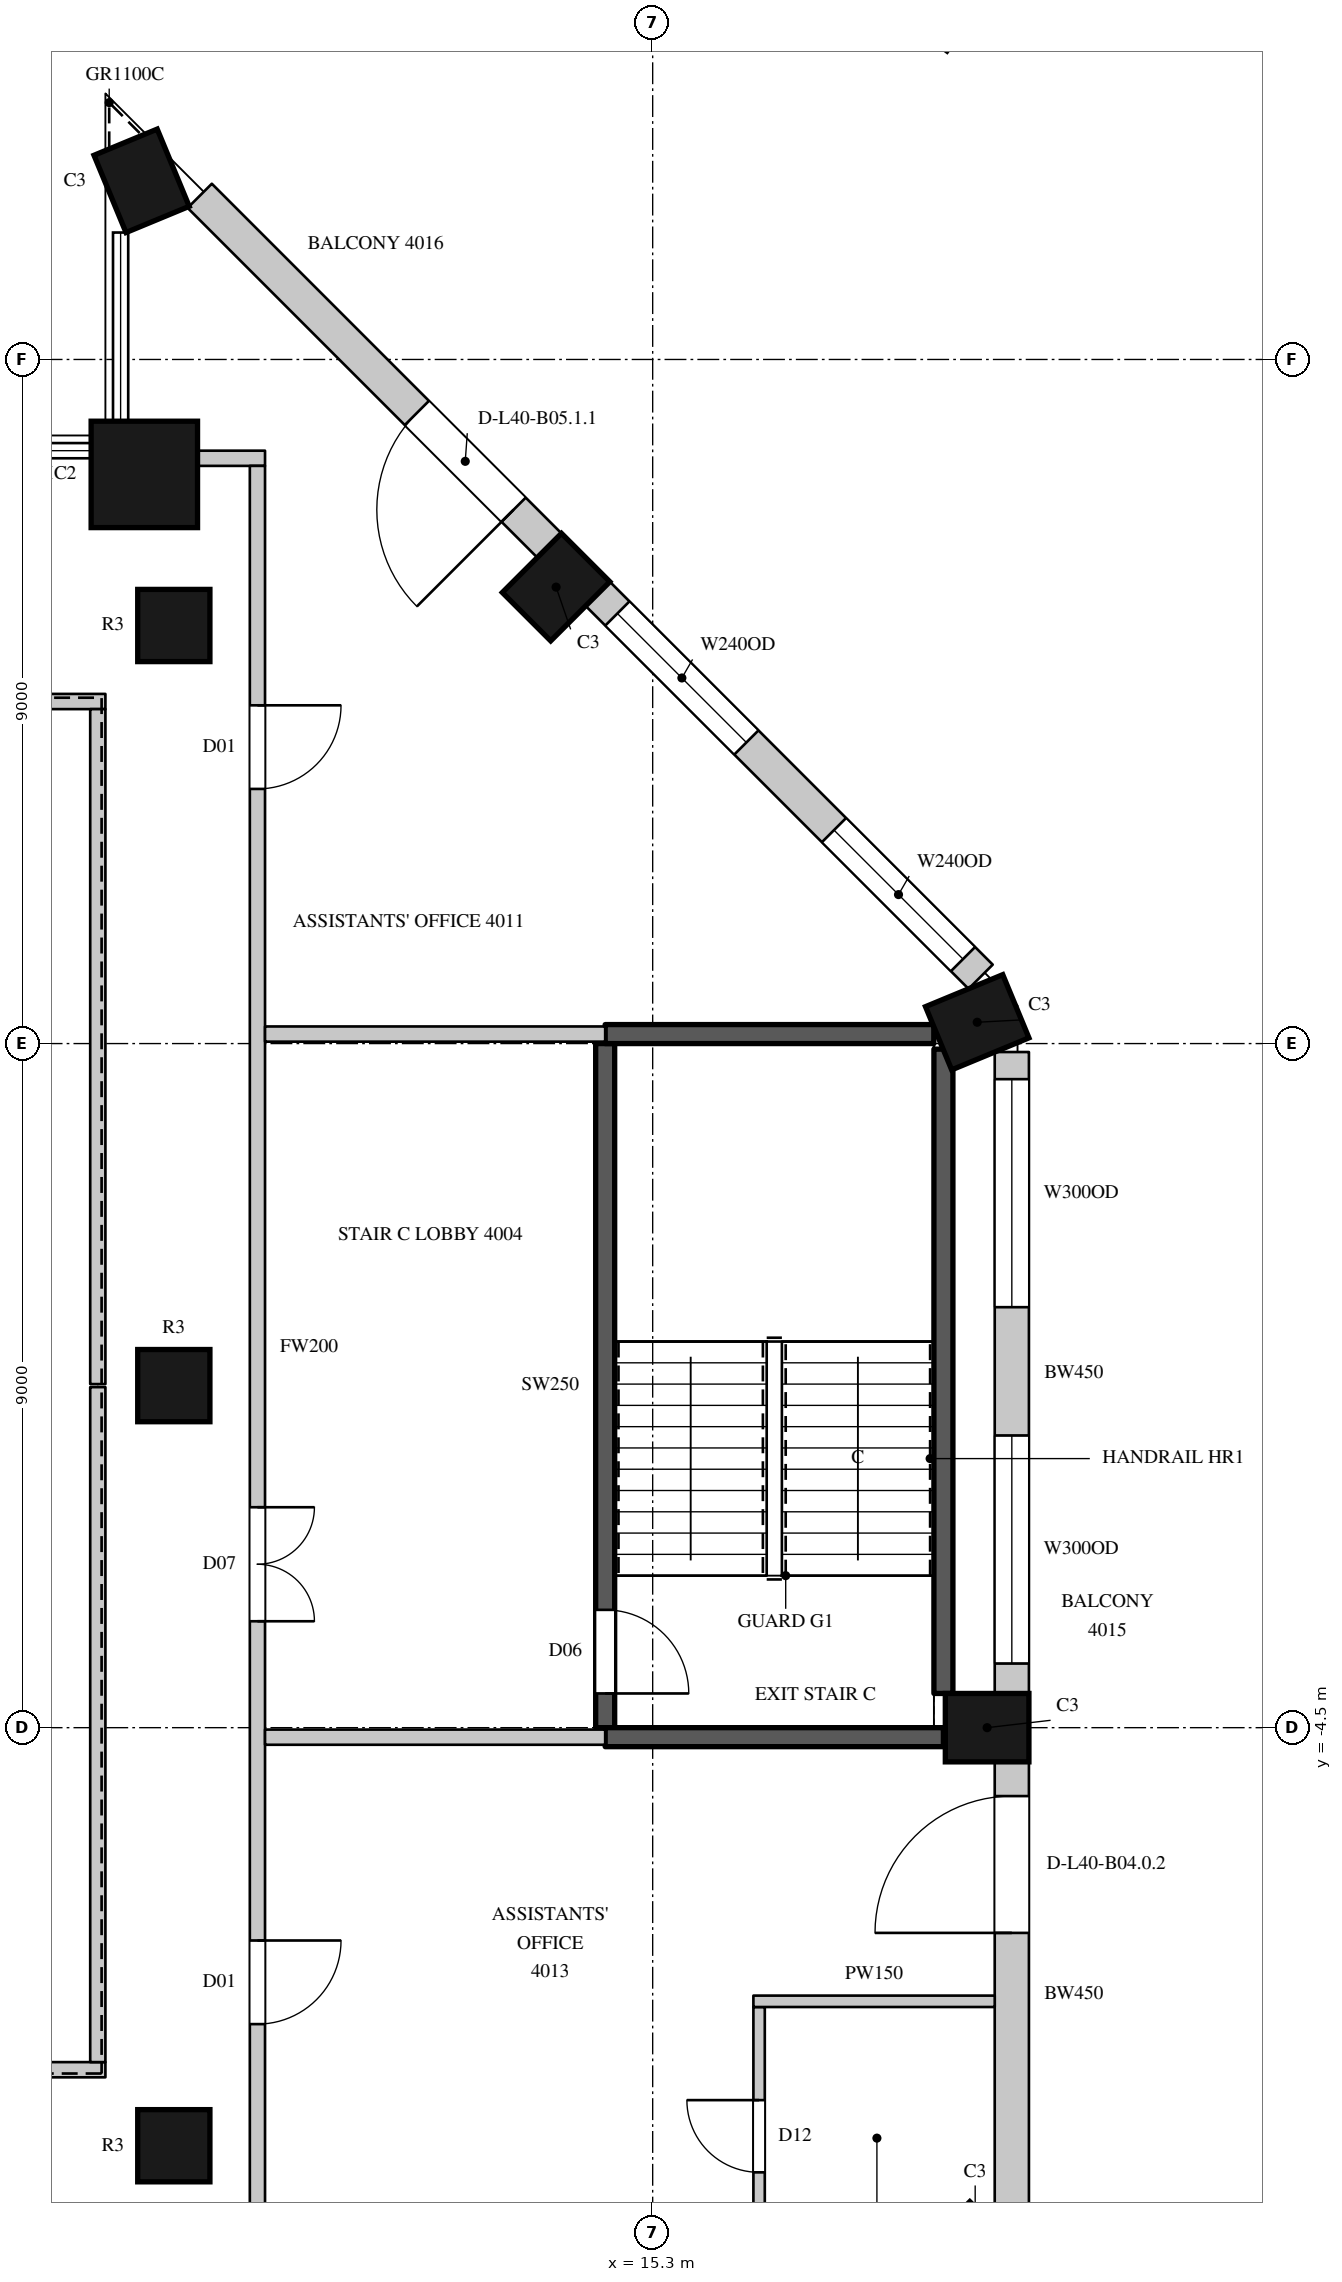
"""IFC4 building model, lengths in metres.
Left out: names, types, materials, properties, quantities, classifications, styles, units other than length and angle.
Written with IfcOpenShell. Run it as: python <this file> out.ifc"""

import sys

from ifc_helpers import new_model, si_unit, direction, frame, frame_2d, origin, origin_2d, place, context, subcontext, project, spatial, rectangle, circle, extrude, element, fill, save


model = new_model("IFC4")
c1 = context("Model", 3, precision=1e-05, world=origin(), true_north=direction((0.0, 1.0)))
c2 = subcontext(c1, "Body", "Model", "MODEL_VIEW")
j1 = project(units=[si_unit("LENGTHUNIT", "METRE"), si_unit("PLANEANGLEUNIT", "RADIAN")], contexts=[c1])
p1 = place(None, origin())
s1 = spatial("IfcSite", under=j1, at=p1, CompositionType="ELEMENT")
p2 = place(p1, origin())
s2 = spatial("IfcBuilding", under=s1, at=p2, CompositionType="ELEMENT")
p3 = place(p2, frame((0.0, 0.0, 185.1)))
s3 = spatial("IfcBuildingStorey", under=s2, at=p3, CompositionType="ELEMENT", Elevation=185.1)
for number, where, z_axis, x_axis in (
    (1, (19.543, -11.443, 0.0), (0.0, 0.0, 1.0), (0.707, 0.707, 0.0)),
    (2, (19.7, -4.5, 0.0), (0.0, 0.0, 1.0), (0.0, 1.0, 0.0)),
    (3, (19.57, 4.78, 0.0), (0.0, 0.0, 1.0), (-0.383, 0.924, 0.0)),
    (4, (14.029, 10.505, 0.0), (0.0, 0.0, 1.0), (-0.707, 0.707, 0.0)),
    (5, (8.576, 15.85, 0.0), (0.0, 0.0, 1.0), (-0.924, -0.383, 0.0)),
):
    element("IfcColumn", number, at=place(p3, frame(where, z_axis=z_axis, x_axis=x_axis)), inside=s3, PredefinedType="COLUMN", context=c2, shape_type="SweptSolid", body=[
        extrude(rectangle(XDim=0.9, YDim=1.1, at=origin_2d()), origin(), (0.0, 0.0, 1.0), 4.1),
    ])
p4 = place(p3, frame((8.612, 11.988, 0.0), z_axis=(0.0, 0.0, 1.0), x_axis=(1.0, 0.0, 0.0)))
e6 = element("IfcColumn", 6, at=p4, inside=s3, PredefinedType="COLUMN", context=c2, shape_type="SweptSolid", body=[
    extrude(circle(Radius=0.7, at=origin_2d()), origin(), (0.0, 0.0, 1.0), 4.1),
])
for number, where, z_axis, x_axis in (
    (7, (9.0, -10.0, 0.0), (0.0, 0.0, 1.0), (1.0, 0.0, 0.0)),
    (8, (9.0, 0.0, 0.0), (0.0, 0.0, 1.0), (1.0, 0.0, 0.0)),
    (9, (9.0, 10.0, 0.0), (0.0, 0.0, 1.0), (1.0, 0.0, 0.0)),
):
    element("IfcColumn", number, at=place(p3, frame(where, z_axis=z_axis, x_axis=x_axis)), inside=s3, PredefinedType="COLUMN", context=c2, shape_type="SweptSolid", body=[
        extrude(circle(Radius=0.475, at=origin_2d()), origin(), (0.0, 0.0, 1.0), 4.1),
    ])
p5 = place(p3, frame((20.025, -11.064, 0.0), z_axis=(0.0, 0.0, 1.0), x_axis=(0.0, 1.0, 0.0)))
e10 = element("IfcWall", 10, at=p5, inside=s3, PredefinedType="SOLIDWALL", context=c2, shape_type="SweptSolid", body=[
    extrude(rectangle(XDim=6.114, YDim=0.45, at=frame_2d((3.057, 0.0))), origin(), (0.0, 0.0, 1.0), 3.8),
])
p6 = place(p5, frame((3.864, 0.0, 0.0)))
e11 = element("IfcOpeningElement", 11, at=p6, cuts=e10, PredefinedType="OPENING", context=c2, shape_type="SweptSolid", body=[
    extrude(rectangle(XDim=1.8, YDim=2.4, at=frame_2d((0.9, 1.2))), frame((0.0, 0.235, 0.0), z_axis=(0.0, -1.0, 0.0), x_axis=(1.0, 0.0, 0.0)), (0.0, 0.0, 1.0), 0.47),
])
p7 = place(p3, frame((20.025, -4.05, 0.0), z_axis=(0.0, 0.0, 1.0), x_axis=(0.0, 1.0, 0.0)))
e12 = element("IfcWall", 12, at=p7, inside=s3, PredefinedType="SOLIDWALL", context=c2, shape_type="SweptSolid", body=[
    extrude(rectangle(XDim=8.439, YDim=0.45, at=frame_2d((4.219, 0.0))), origin(), (0.0, 0.0, 1.0), 3.8),
])
p8 = place(p7, frame((0.394, 0.0, 1.05)))
e13 = element("IfcOpeningElement", 13, at=p8, cuts=e12, PredefinedType="OPENING", context=c2, shape_type="SweptSolid", body=[
    extrude(rectangle(XDim=3.0, YDim=2.4, at=frame_2d((1.5, 1.2))), frame((0.0, 0.235, 0.0), z_axis=(0.0, -1.0, 0.0), x_axis=(1.0, 0.0, 0.0)), (0.0, 0.0, 1.0), 0.47),
])
p9 = place(p7, frame((5.082, 0.0, 1.05)))
e14 = element("IfcOpeningElement", 14, at=p9, cuts=e12, PredefinedType="OPENING", context=c2, shape_type="SweptSolid", body=[
    extrude(rectangle(XDim=3.0, YDim=2.4, at=frame_2d((1.5, 1.2))), frame((0.0, 0.235, 0.0), z_axis=(0.0, -1.0, 0.0), x_axis=(1.0, 0.0, 0.0)), (0.0, 0.0, 1.0), 0.47),
])
p10 = place(p3, frame((19.615, 5.379, 0.0), z_axis=(0.0, 0.0, 1.0), x_axis=(-0.707089646058, 0.7071239159, 0.0)))
e15 = element("IfcWall", 15, at=p10, inside=s3, PredefinedType="SOLIDWALL", context=c2, shape_type="SweptSolid", body=[
    extrude(rectangle(XDim=7.124, YDim=0.45, at=frame_2d((3.562, 0.0))), origin(), (0.0, 0.0, 1.0), 3.8),
])
p11 = place(p10, frame((0.328, 0.0, 1.05)))
e16 = element("IfcOpeningElement", 16, at=p11, cuts=e15, PredefinedType="OPENING", context=c2, shape_type="SweptSolid", body=[
    extrude(rectangle(XDim=2.4, YDim=2.4, at=frame_2d((1.2, 1.2))), frame((0.0, 0.235, 0.0), z_axis=(0.0, -1.0, 0.0), x_axis=(1.0, 0.0, 0.0)), (0.0, 0.0, 1.0), 0.47),
])
p12 = place(p10, frame((4.359, 0.0, 1.05)))
e17 = element("IfcOpeningElement", 17, at=p12, cuts=e15, PredefinedType="OPENING", context=c2, shape_type="SweptSolid", body=[
    extrude(rectangle(XDim=2.4, YDim=2.4, at=frame_2d((1.2, 1.2))), frame((0.0, 0.235, 0.0), z_axis=(0.0, -1.0, 0.0), x_axis=(1.0, 0.0, 0.0)), (0.0, 0.0, 1.0), 0.47),
])
p13 = place(p3, frame((13.941, 11.053, 0.0), z_axis=(0.0, 0.0, 1.0), x_axis=(-0.707106781187, 0.707106781187, 0.0)))
e18 = element("IfcWall", 18, at=p13, inside=s3, PredefinedType="SOLIDWALL", context=c2, shape_type="SweptSolid", body=[
    extrude(rectangle(XDim=6.505, YDim=0.45, at=frame_2d((3.252, 0.0))), origin(), (0.0, 0.0, 1.0), 3.8),
])
p14 = place(p13, frame((0.665, 0.0, 0.0)))
e19 = element("IfcOpeningElement", 19, at=p14, cuts=e18, PredefinedType="OPENING", context=c2, shape_type="SweptSolid", body=[
    extrude(rectangle(XDim=1.8, YDim=2.4, at=frame_2d((0.9, 1.2))), frame((0.0, 0.235, 0.0), z_axis=(0.0, -1.0, 0.0), x_axis=(1.0, 0.0, 0.0)), (0.0, 0.0, 1.0), 0.47),
])
for number, where, z_axis, x_axis in (
    (20, (-6.1, -9.0, 0.0), (0.0, 0.0, 1.0), (1.0, 0.0, 0.0)),
    (21, (-6.1, 9.0, 0.0), (0.0, 0.0, 1.0), (1.0, 0.0, 0.0)),
):
    element("IfcWall", number, at=place(p3, frame(where, z_axis=z_axis, x_axis=x_axis)), inside=s3, PredefinedType="PARTITIONING", context=c2, shape_type="SweptSolid", body=[
        extrude(rectangle(XDim=14.2, YDim=0.2, at=frame_2d((7.1, 0.0))), origin(), (0.0, 0.0, 1.0), 3.8),
    ])
for number, where, z_axis, x_axis in (
    (22, (8.0, -8.9, 0.0), (0.0, 0.0, 1.0), (0.0, 1.0, 0.0)),
    (23, (8.0, 0.02, 0.0), (0.0, 0.0, 1.0), (0.0, 1.0, 0.0)),
):
    element("IfcWall", number, at=place(p3, frame(where, z_axis=z_axis, x_axis=x_axis)), inside=s3, PredefinedType="PARTITIONING", context=c2, shape_type="SweptSolid", body=[
        extrude(rectangle(XDim=8.88, YDim=0.2, at=frame_2d((4.44, 0.0))), origin(), (0.0, 0.0, 1.0), 3.8),
    ])
p15 = place(p3, frame((9.296, 12.2, 0.0), z_axis=(0.0, 0.0, 1.0), x_axis=(1.0, 0.0, 0.0)))
e24 = element("IfcWall", 24, at=p15, inside=s3, PredefinedType="PARTITIONING", context=c2, shape_type="SweptSolid", body=[
    extrude(rectangle(XDim=0.904, YDim=0.2, at=frame_2d((0.452, 0.0))), origin(), (0.0, 0.0, 1.0), 3.8),
])
p16 = place(p3, frame((10.1, -11.1, 0.0), z_axis=(0.0, 0.0, 1.0), x_axis=(0.0, 1.0, 0.0)))
e25 = element("IfcWall", 25, at=p16, inside=s3, PredefinedType="PARTITIONING", context=c2, shape_type="SweptSolid", body=[
    extrude(rectangle(XDim=23.2, YDim=0.2, at=frame_2d((11.6, 0.0))), origin(), (0.0, 0.0, 1.0), 3.8),
])
p17 = place(p16, frame((8.0, 0.0, 0.0)))
e26 = element("IfcOpeningElement", 26, at=p17, cuts=e25, PredefinedType="OPENING", context=c2, shape_type="SweptSolid", body=[
    extrude(rectangle(XDim=1.5, YDim=2.4, at=frame_2d((0.75, 1.2))), frame((0.0, 0.11, 0.0), z_axis=(0.0, -1.0, 0.0), x_axis=(1.0, 0.0, 0.0)), (0.0, 0.0, 1.0), 0.22),
])
p18 = place(p16, frame((18.95, 0.0, 0.0)))
e27 = element("IfcOpeningElement", 27, at=p18, cuts=e25, PredefinedType="OPENING", context=c2, shape_type="SweptSolid", body=[
    extrude(rectangle(XDim=1.1, YDim=2.4, at=frame_2d((0.55, 1.2))), frame((0.0, 0.11, 0.0), z_axis=(0.0, -1.0, 0.0), x_axis=(1.0, 0.0, 0.0)), (0.0, 0.0, 1.0), 0.22),
])
p19 = place(p16, frame((2.7, 0.0, 0.0)))
e28 = element("IfcOpeningElement", 28, at=p19, cuts=e25, PredefinedType="OPENING", context=c2, shape_type="SweptSolid", body=[
    extrude(rectangle(XDim=1.1, YDim=2.4, at=frame_2d((0.55, 1.2))), frame((0.0, 0.11, 0.0), z_axis=(0.0, -1.0, 0.0), x_axis=(1.0, 0.0, 0.0)), (0.0, 0.0, 1.0), 0.22),
])
for number, where, z_axis, x_axis in (
    (29, (10.2, -4.625, 0.0), (0.0, 0.0, 1.0), (1.0, 0.0, 0.0)),
    (30, (10.2, 4.625, 0.0), (0.0, 0.0, 1.0), (1.0, 0.0, 0.0)),
):
    element("IfcWall", number, at=place(p3, frame(where, z_axis=z_axis, x_axis=x_axis)), inside=s3, PredefinedType="PARTITIONING", context=c2, shape_type="SweptSolid", body=[
        extrude(rectangle(XDim=4.475, YDim=0.2, at=frame_2d((2.238, 0.0))), origin(), (0.0, 0.0, 1.0), 3.8),
    ])
p20 = place(p3, frame((16.7, -11.7, 0.0), z_axis=(0.0, 0.0, 1.0), x_axis=(0.0, 1.0, 0.0)))
e31 = element("IfcWall", 31, at=p20, inside=s3, PredefinedType="PARTITIONING", context=c2, shape_type="SweptSolid", body=[
    extrude(rectangle(XDim=3.525, YDim=0.15, at=frame_2d((1.762, 0.0))), origin(), (0.0, 0.0, 1.0), 3.8),
])
p21 = place(p20, frame((1.35, 0.0, 0.0)))
e32 = element("IfcOpeningElement", 32, at=p21, cuts=e31, PredefinedType="OPENING", context=c2, shape_type="SweptSolid", body=[
    extrude(rectangle(XDim=0.95, YDim=2.2, at=frame_2d((0.475, 1.1))), frame((0.0, 0.085, 0.0), z_axis=(0.0, -1.0, 0.0), x_axis=(1.0, 0.0, 0.0)), (0.0, 0.0, 1.0), 0.17),
])
p22 = place(p3, frame((16.625, -8.1, 0.0), z_axis=(0.0, 0.0, 1.0), x_axis=(1.0, 0.0, 0.0)))
e33 = element("IfcWall", 33, at=p22, inside=s3, PredefinedType="PARTITIONING", context=c2, shape_type="SweptSolid", body=[
    extrude(rectangle(XDim=3.175, YDim=0.15, at=frame_2d((1.587, 0.0))), origin(), (0.0, 0.0, 1.0), 3.15),
])
p23 = place(p3, frame((14.675, -4.5, 0.0), z_axis=(0.0, 0.0, 1.0), x_axis=(0.0, 1.0, 0.0)))
e34 = element("IfcWall", 34, at=p23, inside=s3, PredefinedType="SHEAR", context=c2, shape_type="SweptSolid", body=[
    extrude(rectangle(XDim=9.0, YDim=0.25, at=frame_2d((4.5, 0.0))), origin(), (0.0, 0.0, 1.0), 3.8),
])
p24 = place(p23, frame((0.45, 0.0, 0.0)))
e35 = element("IfcOpeningElement", 35, at=p24, cuts=e34, PredefinedType="OPENING", context=c2, shape_type="SweptSolid", body=[
    extrude(rectangle(XDim=1.1, YDim=2.2, at=frame_2d((0.55, 1.1))), frame((0.0, 0.135, 0.0), z_axis=(0.0, -1.0, 0.0), x_axis=(1.0, 0.0, 0.0)), (0.0, 0.0, 1.0), 0.27),
])
p25 = place(p3, frame((14.675, -4.625, 0.0), z_axis=(0.0, 0.0, 1.0), x_axis=(1.0, 0.0, 0.0)))
e36 = element("IfcWall", 36, at=p25, inside=s3, PredefinedType="SHEAR", context=c2, shape_type="SweptSolid", body=[
    extrude(rectangle(XDim=4.45, YDim=0.25, at=frame_2d((2.225, 0.0))), origin(), (0.0, 0.0, 1.0), 3.8),
])
p26 = place(p3, frame((14.675, 4.625, 0.0), z_axis=(0.0, 0.0, 1.0), x_axis=(1.0, 0.0, 0.0)))
e37 = element("IfcWall", 37, at=p26, inside=s3, PredefinedType="SHEAR", context=c2, shape_type="SweptSolid", body=[
    extrude(rectangle(XDim=4.324, YDim=0.25, at=frame_2d((2.162, 0.0))), origin(), (0.0, 0.0, 1.0), 3.8),
])
p27 = place(p3, frame((19.125, -4.05, 0.0), z_axis=(0.0, 0.0, 1.0), x_axis=(0.0, 1.0, 0.0)))
e38 = element("IfcWall", 38, at=p27, inside=s3, PredefinedType="SHEAR", context=c2, shape_type="SweptSolid", body=[
    extrude(rectangle(XDim=8.477, YDim=0.25, at=frame_2d((4.238, 0.0))), origin(), (0.0, 0.0, 1.0), 3.8),
])
p28 = place(p6, origin())
e39 = element("IfcDoor", 39, at=p28, inside=s3, OperationType="SLIDING_TO_LEFT", PredefinedType="DOOR", context=c2, shape_type="SweptSolid", body=[
    extrude(rectangle(XDim=1.8, YDim=2.4, at=frame_2d((0.9, 1.2))), frame((0.0, 0.13, 0.0), z_axis=(0.0, -1.0, 0.0), x_axis=(1.0, 0.0, 0.0)), (0.0, 0.0, 1.0), 0.05),
])
fill(e11, e39)
p29 = place(p8, origin())
e40 = element("IfcWindow", 40, at=p29, inside=s3, PartitioningType="SINGLE_PANEL", PredefinedType="WINDOW", context=c2, shape_type="SweptSolid", body=[
    extrude(rectangle(XDim=3.0, YDim=2.4, at=frame_2d((1.5, 1.2))), frame((0.0, 0.135, 0.0), z_axis=(0.0, -1.0, 0.0), x_axis=(1.0, 0.0, 0.0)), (0.0, 0.0, 1.0), 0.06),
])
fill(e13, e40)
p30 = place(p9, origin())
e41 = element("IfcWindow", 41, at=p30, inside=s3, PartitioningType="SINGLE_PANEL", PredefinedType="WINDOW", context=c2, shape_type="SweptSolid", body=[
    extrude(rectangle(XDim=3.0, YDim=2.4, at=frame_2d((1.5, 1.2))), frame((0.0, 0.135, 0.0), z_axis=(0.0, -1.0, 0.0), x_axis=(1.0, 0.0, 0.0)), (0.0, 0.0, 1.0), 0.06),
])
fill(e14, e41)
p31 = place(p11, origin())
e42 = element("IfcWindow", 42, at=p31, inside=s3, PartitioningType="SINGLE_PANEL", PredefinedType="WINDOW", context=c2, shape_type="SweptSolid", body=[
    extrude(rectangle(XDim=2.4, YDim=2.4, at=frame_2d((1.2, 1.2))), frame((0.0, 0.135, 0.0), z_axis=(0.0, -1.0, 0.0), x_axis=(1.0, 0.0, 0.0)), (0.0, 0.0, 1.0), 0.06),
])
fill(e16, e42)
p32 = place(p12, origin())
e43 = element("IfcWindow", 43, at=p32, inside=s3, PartitioningType="SINGLE_PANEL", PredefinedType="WINDOW", context=c2, shape_type="SweptSolid", body=[
    extrude(rectangle(XDim=2.4, YDim=2.4, at=frame_2d((1.2, 1.2))), frame((0.0, 0.135, 0.0), z_axis=(0.0, -1.0, 0.0), x_axis=(1.0, 0.0, 0.0)), (0.0, 0.0, 1.0), 0.06),
])
fill(e17, e43)
p33 = place(p14, origin())
e44 = element("IfcDoor", 44, at=p33, inside=s3, OperationType="SLIDING_TO_LEFT", PredefinedType="DOOR", context=c2, shape_type="SweptSolid", body=[
    extrude(rectangle(XDim=1.8, YDim=2.4, at=frame_2d((0.9, 1.2))), frame((0.0, 0.13, 0.0), z_axis=(0.0, -1.0, 0.0), x_axis=(1.0, 0.0, 0.0)), (0.0, 0.0, 1.0), 0.05),
])
fill(e19, e44)
p34 = place(p17, origin())
e45 = element("IfcDoor", 45, at=p34, inside=s3, OperationType="DOUBLE_DOOR_SINGLE_SWING", PredefinedType="DOOR", context=c2, shape_type="SweptSolid", body=[
    extrude(rectangle(XDim=1.5, YDim=2.4, at=frame_2d((0.75, 1.2))), frame((0.0, 0.025, 0.0), z_axis=(0.0, -1.0, 0.0), x_axis=(1.0, 0.0, 0.0)), (0.0, 0.0, 1.0), 0.05),
])
fill(e26, e45)
p35 = place(p18, origin())
e46 = element("IfcDoor", 46, at=p35, inside=s3, OperationType="SINGLE_SWING_LEFT", PredefinedType="DOOR", context=c2, shape_type="SweptSolid", body=[
    extrude(rectangle(XDim=1.1, YDim=2.4, at=frame_2d((0.55, 1.2))), frame((0.0, 0.025, 0.0), z_axis=(0.0, -1.0, 0.0), x_axis=(1.0, 0.0, 0.0)), (0.0, 0.0, 1.0), 0.05),
])
fill(e27, e46)
p36 = place(p19, origin())
e47 = element("IfcDoor", 47, at=p36, inside=s3, OperationType="SINGLE_SWING_LEFT", PredefinedType="DOOR", context=c2, shape_type="SweptSolid", body=[
    extrude(rectangle(XDim=1.1, YDim=2.4, at=frame_2d((0.55, 1.2))), frame((0.0, 0.025, 0.0), z_axis=(0.0, -1.0, 0.0), x_axis=(1.0, 0.0, 0.0)), (0.0, 0.0, 1.0), 0.05),
])
fill(e28, e47)
p37 = place(p21, origin())
e48 = element("IfcDoor", 48, at=p37, inside=s3, OperationType="SINGLE_SWING_RIGHT", PredefinedType="DOOR", context=c2, shape_type="SweptSolid", body=[
    extrude(rectangle(XDim=0.95, YDim=2.2, at=frame_2d((0.475, 1.1))), frame((0.0, 0.025, 0.0), z_axis=(0.0, -1.0, 0.0), x_axis=(1.0, 0.0, 0.0)), (0.0, 0.0, 1.0), 0.05),
])
fill(e32, e48)
p38 = place(p24, origin())
e49 = element("IfcDoor", 49, at=p38, inside=s3, OperationType="SINGLE_SWING_RIGHT", PredefinedType="DOOR", context=c2, shape_type="SweptSolid", body=[
    extrude(rectangle(XDim=1.1, YDim=2.2, at=frame_2d((0.55, 1.1))), frame((0.0, 0.025, 0.0), z_axis=(0.0, -1.0, 0.0), x_axis=(1.0, 0.0, 0.0)), (0.0, 0.0, 1.0), 0.05),
])
fill(e35, e49)
save(model, sys.argv[1])
